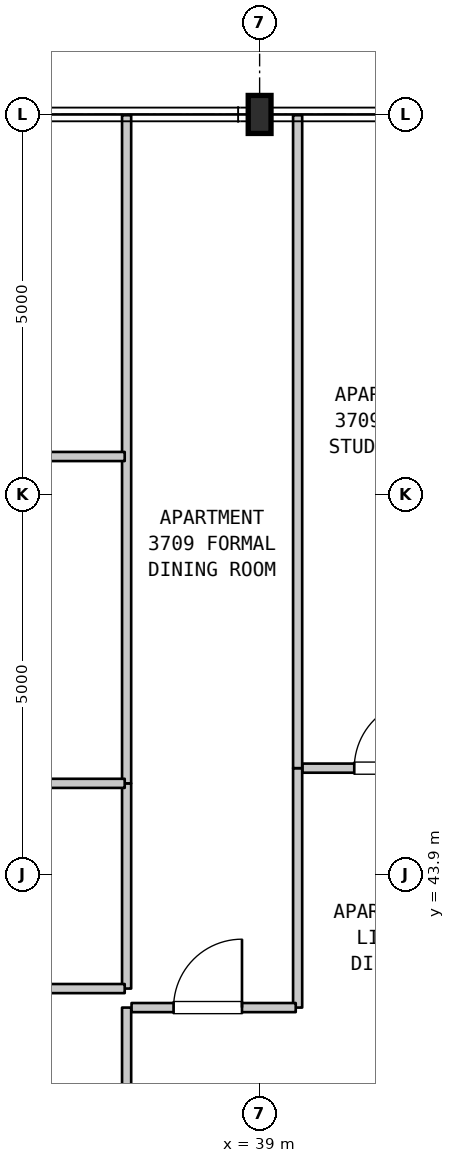
"""IFC4 building model, lengths in metres.
Left out: names, types, materials, properties, quantities, classifications, styles, units other than length and angle.
Written with IfcOpenShell. Run it as: python <this file> out.ifc"""

import sys

from ifc_helpers import new_model, si_unit, direction, frame, frame_2d, origin, origin_2d, place, context, subcontext, project, spatial, rectangle, i_section, extrude, element, fill, save


model = new_model("IFC4")
c1 = context("Model", 3, precision=1e-05, world=origin(), true_north=direction((0.0, 1.0)))
c2 = subcontext(c1, "Body", "Model", "MODEL_VIEW")
j1 = project(units=[si_unit("LENGTHUNIT", "METRE"), si_unit("PLANEANGLEUNIT", "RADIAN")], contexts=[c1])
p1 = place(None, origin())
s1 = spatial("IfcSite", under=j1, at=p1, CompositionType="ELEMENT")
p2 = place(p1, origin())
s2 = spatial("IfcBuilding", under=s1, at=p2, CompositionType="ELEMENT")
p3 = place(p2, frame((0.0, 0.0, 152.0)))
s3 = spatial("IfcBuildingStorey", under=s2, at=p3, CompositionType="ELEMENT", Elevation=152.0)
p4 = place(p3, frame((39.0, 53.9, 0.0), z_axis=(0.0, 0.0, 1.0), x_axis=(1.0, 0.0, 0.0)))
e1 = element("IfcColumn", 1, at=p4, inside=s3, PredefinedType="COLUMN", context=c2, shape_type="SweptSolid", body=[
    extrude(i_section(OverallWidth=0.3, OverallDepth=0.5, WebThickness=0.014, FlangeThickness=0.028, FilletRadius=0.027, at=origin_2d()), origin(), (0.0, 0.0, 1.0), 3.7),
])
p5 = place(p3, frame((37.25, 40.1, 0.0), z_axis=(0.0, 0.0, 1.0), x_axis=(0.0, 1.0, 0.0)))
e2 = element("IfcWall", 2, at=p5, inside=s3, PredefinedType="PARTITIONING", context=c2, shape_type="SweptSolid", body=[
    extrude(rectangle(XDim=2.05, YDim=0.12, at=frame_2d((1.025, 0.0))), origin(), (0.0, 0.0, 1.0), 3.385),
])
p6 = place(p3, frame((37.25, 42.4, 0.0), z_axis=(0.0, 0.0, 1.0), x_axis=(0.0, 1.0, 0.0)))
e3 = element("IfcWall", 3, at=p6, inside=s3, PredefinedType="PARTITIONING", context=c2, shape_type="SweptSolid", body=[
    extrude(rectangle(XDim=2.7, YDim=0.12, at=frame_2d((1.35, 0.0))), origin(), (0.0, 0.0, 1.0), 3.385),
])
p7 = place(p3, frame((37.25, 45.1, 0.0), z_axis=(0.0, 0.0, 1.0), x_axis=(0.0, 1.0, 0.0)))
e4 = element("IfcWall", 4, at=p7, inside=s3, PredefinedType="PARTITIONING", context=c2, shape_type="SweptSolid", body=[
    extrude(rectangle(XDim=8.79, YDim=0.12, at=frame_2d((4.395, 0.0))), origin(), (0.0, 0.0, 1.0), 3.385),
])
p8 = place(p3, frame((39.5, 42.15, 0.0), z_axis=(0.0, 0.0, 1.0), x_axis=(0.0, 1.0, 0.0)))
e5 = element("IfcWall", 5, at=p8, inside=s3, PredefinedType="PARTITIONING", context=c2, shape_type="SweptSolid", body=[
    extrude(rectangle(XDim=3.15, YDim=0.12, at=frame_2d((1.575, 0.0))), origin(), (0.0, 0.0, 1.0), 3.385),
])
p9 = place(p3, frame((39.5, 45.3, 0.0), z_axis=(0.0, 0.0, 1.0), x_axis=(0.0, 1.0, 0.0)))
e6 = element("IfcWall", 6, at=p9, inside=s3, PredefinedType="PARTITIONING", context=c2, shape_type="SweptSolid", body=[
    extrude(rectangle(XDim=8.59, YDim=0.12, at=frame_2d((4.295, 0.0))), origin(), (0.0, 0.0, 1.0), 3.385),
])
p10 = place(p3, frame((37.315, 42.15, 0.0), z_axis=(0.0, 0.0, 1.0), x_axis=(1.0, 0.0, 0.0)))
e7 = element("IfcWall", 7, at=p10, inside=s3, PredefinedType="PARTITIONING", context=c2, shape_type="SweptSolid", body=[
    extrude(rectangle(XDim=2.16, YDim=0.12, at=frame_2d((1.08, 0.0))), origin(), (0.0, 0.0, 1.0), 3.385),
])
p11 = place(p10, frame((0.553, 0.0, 0.0)))
e8 = element("IfcOpeningElement", 8, at=p11, cuts=e7, PredefinedType="OPENING", context=c2, shape_type="SweptSolid", body=[
    extrude(rectangle(XDim=0.9, YDim=2.15, at=frame_2d((0.45, 1.075))), frame((0.0, 0.07, 0.0), z_axis=(0.0, -1.0, 0.0), x_axis=(1.0, 0.0, 0.0)), (0.0, 0.0, 1.0), 0.14),
])
for number, where, z_axis, x_axis in (
    (9, (32.135, 42.4, 0.0), (0.0, 0.0, 1.0), (1.0, 0.0, 0.0)),
    (10, (32.135, 45.1, 0.0), (0.0, 0.0, 1.0), (1.0, 0.0, 0.0)),
):
    element("IfcWall", number, at=place(p3, frame(where, z_axis=z_axis, x_axis=x_axis)), inside=s3, PredefinedType="PARTITIONING", context=c2, shape_type="SweptSolid", body=[
        extrude(rectangle(XDim=5.09, YDim=0.12, at=frame_2d((2.545, 0.0))), origin(), (0.0, 0.0, 1.0), 3.385),
    ])
p12 = place(p3, frame((39.565, 45.3, 0.0), z_axis=(0.0, 0.0, 1.0), x_axis=(1.0, 0.0, 0.0)))
e11 = element("IfcWall", 11, at=p12, inside=s3, PredefinedType="PARTITIONING", context=c2, shape_type="SweptSolid", body=[
    extrude(rectangle(XDim=2.26, YDim=0.12, at=frame_2d((1.13, 0.0))), origin(), (0.0, 0.0, 1.0), 3.385),
])
p13 = place(p12, frame((0.68, 0.0, 0.0)))
e12 = element("IfcOpeningElement", 12, at=p13, cuts=e11, PredefinedType="OPENING", context=c2, shape_type="SweptSolid", body=[
    extrude(rectangle(XDim=0.9, YDim=2.15, at=frame_2d((0.45, 1.075))), frame((0.0, 0.07, 0.0), z_axis=(0.0, -1.0, 0.0), x_axis=(1.0, 0.0, 0.0)), (0.0, 0.0, 1.0), 0.14),
])
p14 = place(p3, frame((32.135, 49.4, 0.0), z_axis=(0.0, 0.0, 1.0), x_axis=(1.0, 0.0, 0.0)))
e13 = element("IfcWall", 13, at=p14, inside=s3, PredefinedType="PARTITIONING", context=c2, shape_type="SweptSolid", body=[
    extrude(rectangle(XDim=5.09, YDim=0.12, at=frame_2d((2.545, 0.0))), origin(), (0.0, 0.0, 1.0), 3.385),
])
p15 = place(p11, origin())
e14 = element("IfcDoor", 14, at=p15, inside=s3, OperationType="SINGLE_SWING_RIGHT", PredefinedType="DOOR", context=c2, shape_type="SweptSolid", body=[
    extrude(rectangle(XDim=0.9, YDim=2.15, at=frame_2d((0.45, 1.075))), frame((0.0, 0.025, 0.0), z_axis=(0.0, -1.0, 0.0), x_axis=(1.0, 0.0, 0.0)), (0.0, 0.0, 1.0), 0.05),
])
fill(e8, e14)
p16 = place(p13, origin())
e15 = element("IfcDoor", 15, at=p16, inside=s3, OperationType="SINGLE_SWING_RIGHT", PredefinedType="DOOR", context=c2, shape_type="SweptSolid", body=[
    extrude(rectangle(XDim=0.9, YDim=2.15, at=frame_2d((0.45, 1.075))), frame((0.0, 0.025, 0.0), z_axis=(0.0, -1.0, 0.0), x_axis=(1.0, 0.0, 0.0)), (0.0, 0.0, 1.0), 0.05),
])
fill(e12, e15)
save(model, sys.argv[1])
